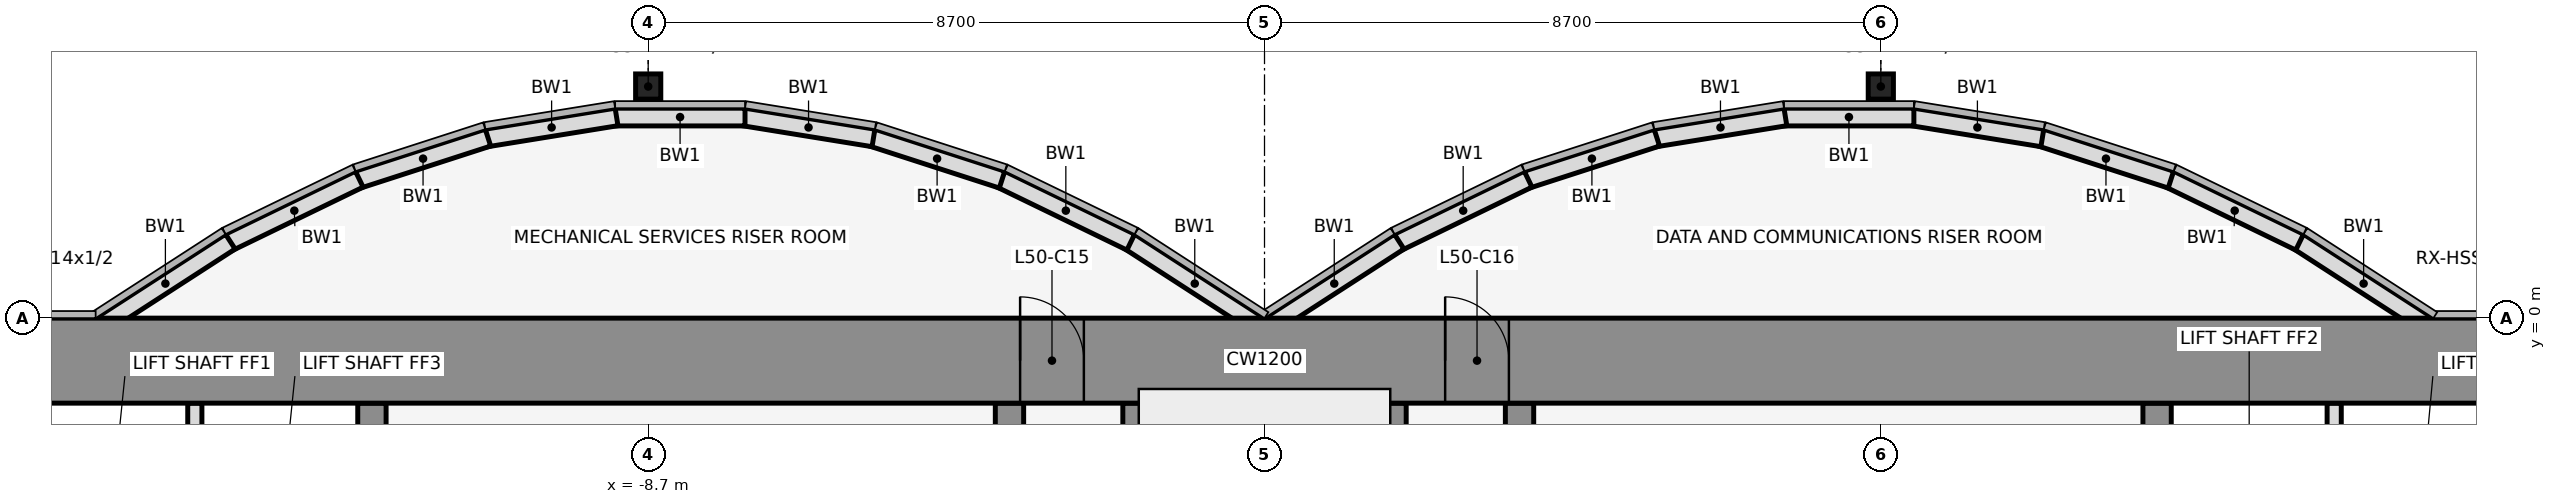
"""IFC4 building model, lengths in metres.
Left out: names, types, materials, properties, quantities, classifications, styles, units other than length and angle.
Written with IfcOpenShell. Run it as: python <this file> out.ifc"""

import sys

from ifc_helpers import new_model, si_unit, direction, frame, frame_2d, origin, origin_2d, place, context, subcontext, project, spatial, rectangle, hollow_rectangle, extrude, element, fill, save


model = new_model("IFC4")
c1 = context("Model", 3, precision=1e-05, world=origin(), true_north=direction((0.0, 1.0)))
c2 = subcontext(c1, "Body", "Model", "MODEL_VIEW")
j1 = project(units=[si_unit("LENGTHUNIT", "METRE"), si_unit("PLANEANGLEUNIT", "RADIAN")], contexts=[c1])
p1 = place(None, origin())
s1 = spatial("IfcSite", under=j1, at=p1, CompositionType="ELEMENT")
p2 = place(p1, origin())
s2 = spatial("IfcBuilding", under=s1, at=p2, CompositionType="ELEMENT")
p3 = place(p2, frame((0.0, 0.0, 223.7)))
s3 = spatial("IfcBuildingStorey", under=s2, at=p3, CompositionType="ELEMENT", Elevation=223.7)
for number, where, z_axis, x_axis in (
    (1, (-8.7, 3.269, 0.0), (0.0, 0.0, 1.0), (1.0, 0.0, 0.0)),
    (2, (8.7, 3.269, 0.0), (0.0, 0.0, 1.0), (1.0, 0.0, 0.0)),
):
    element("IfcColumn", number, at=place(p3, frame(where, z_axis=z_axis, x_axis=x_axis)), inside=s3, PredefinedType="COLUMN", context=c2, shape_type="SweptSolid", body=[
        extrude(hollow_rectangle(XDim=0.356, YDim=0.356, WallThickness=0.012, at=origin_2d()), origin(), (0.0, 0.0, 1.0), 4.1),
    ])
p4 = place(p3, frame((16.432, -0.105, 0.0), z_axis=(0.0, 0.0, 1.0), x_axis=(-0.83981312244, 0.542875602121, 0.0)))
e3 = element("IfcWall", 3, at=p4, inside=s3, PredefinedType="STANDARD", context=c2, shape_type="SweptSolid", body=[
    extrude(rectangle(XDim=2.183, YDim=0.25, at=frame_2d((1.091, 0.0))), origin(), (0.0, 0.0, 1.0), 3.95),
])
p5 = place(p3, frame((14.612, 1.073, 0.0), z_axis=(0.0, 0.0, 1.0), x_axis=(-0.89982408427, 0.436252928206, 0.0)))
e4 = element("IfcWall", 4, at=p5, inside=s3, PredefinedType="STANDARD", context=c2, shape_type="SweptSolid", body=[
    extrude(rectangle(XDim=2.038, YDim=0.25, at=frame_2d((1.019, 0.0))), origin(), (0.0, 0.0, 1.0), 3.95),
])
p6 = place(p3, frame((12.795, 1.955, 0.0), z_axis=(0.0, 0.0, 1.0), x_axis=(-0.951495806175, 0.307661714928, 0.0)))
e5 = element("IfcWall", 5, at=p6, inside=s3, PredefinedType="STANDARD", context=c2, shape_type="SweptSolid", body=[
    extrude(rectangle(XDim=1.927, YDim=0.25, at=frame_2d((0.963, 0.0))), origin(), (0.0, 0.0, 1.0), 3.95),
])
p7 = place(p3, frame((10.98, 2.543, 0.0), z_axis=(0.0, 0.0, 1.0), x_axis=(-0.987181718931, 0.159600293885, 0.0)))
e6 = element("IfcWall", 6, at=p7, inside=s3, PredefinedType="STANDARD", context=c2, shape_type="SweptSolid", body=[
    extrude(rectangle(XDim=1.857, YDim=0.25, at=frame_2d((0.929, 0.0))), origin(), (0.0, 0.0, 1.0), 3.95),
])
p8 = place(p3, frame((9.167, 2.838, 0.0), z_axis=(0.0, 0.0, 1.0), x_axis=(-1.0, 0.0, 0.0)))
e7 = element("IfcWall", 7, at=p8, inside=s3, PredefinedType="STANDARD", context=c2, shape_type="SweptSolid", body=[
    extrude(rectangle(XDim=1.833, YDim=0.25, at=frame_2d((0.917, 0.0))), origin(), (0.0, 0.0, 1.0), 3.95),
])
p9 = place(p3, frame((7.353, 2.84, 0.0), z_axis=(0.0, 0.0, 1.0), x_axis=(-0.987181718931, -0.159600293885, 0.0)))
e8 = element("IfcWall", 8, at=p9, inside=s3, PredefinedType="STANDARD", context=c2, shape_type="SweptSolid", body=[
    extrude(rectangle(XDim=1.857, YDim=0.25, at=frame_2d((0.929, 0.0))), origin(), (0.0, 0.0, 1.0), 3.95),
])
p10 = place(p3, frame((5.538, 2.548, 0.0), z_axis=(0.0, 0.0, 1.0), x_axis=(-0.951495806175, -0.307661714928, 0.0)))
e9 = element("IfcWall", 9, at=p10, inside=s3, PredefinedType="STANDARD", context=c2, shape_type="SweptSolid", body=[
    extrude(rectangle(XDim=1.927, YDim=0.25, at=frame_2d((0.963, 0.0))), origin(), (0.0, 0.0, 1.0), 3.95),
])
p11 = place(p3, frame((3.721, 1.962, 0.0), z_axis=(0.0, 0.0, 1.0), x_axis=(-0.89982408427, -0.436252928206, 0.0)))
e10 = element("IfcWall", 10, at=p11, inside=s3, PredefinedType="STANDARD", context=c2, shape_type="SweptSolid", body=[
    extrude(rectangle(XDim=2.038, YDim=0.25, at=frame_2d((1.019, 0.0))), origin(), (0.0, 0.0, 1.0), 3.95),
])
for number, where, z_axis, x_axis in (
    (11, (1.901, 1.08, 0.0), (0.0, 0.0, 1.0), (-0.84, -0.543, 0.0)),
    (12, (-0.068, -0.105, 0.0), (0.0, 0.0, 1.0), (-0.84, 0.543, 0.0)),
):
    element("IfcWall", number, at=place(p3, frame(where, z_axis=z_axis, x_axis=x_axis)), inside=s3, PredefinedType="STANDARD", context=c2, shape_type="SweptSolid", body=[
        extrude(rectangle(XDim=2.183, YDim=0.25, at=frame_2d((1.091, 0.0))), origin(), (0.0, 0.0, 1.0), 3.95),
    ])
p12 = place(p3, frame((-1.888, 1.073, 0.0), z_axis=(0.0, 0.0, 1.0), x_axis=(-0.89982408427, 0.436252928206, 0.0)))
e13 = element("IfcWall", 13, at=p12, inside=s3, PredefinedType="STANDARD", context=c2, shape_type="SweptSolid", body=[
    extrude(rectangle(XDim=2.038, YDim=0.25, at=frame_2d((1.019, 0.0))), origin(), (0.0, 0.0, 1.0), 3.95),
])
p13 = place(p3, frame((-3.705, 1.955, 0.0), z_axis=(0.0, 0.0, 1.0), x_axis=(-0.951495806175, 0.307661714928, 0.0)))
e14 = element("IfcWall", 14, at=p13, inside=s3, PredefinedType="STANDARD", context=c2, shape_type="SweptSolid", body=[
    extrude(rectangle(XDim=1.927, YDim=0.25, at=frame_2d((0.963, 0.0))), origin(), (0.0, 0.0, 1.0), 3.95),
])
p14 = place(p3, frame((-5.52, 2.543, 0.0), z_axis=(0.0, 0.0, 1.0), x_axis=(-0.987181718931, 0.159600293885, 0.0)))
e15 = element("IfcWall", 15, at=p14, inside=s3, PredefinedType="STANDARD", context=c2, shape_type="SweptSolid", body=[
    extrude(rectangle(XDim=1.857, YDim=0.25, at=frame_2d((0.929, 0.0))), origin(), (0.0, 0.0, 1.0), 3.95),
])
p15 = place(p3, frame((-7.333, 2.838, 0.0), z_axis=(0.0, 0.0, 1.0), x_axis=(-1.0, 0.0, 0.0)))
e16 = element("IfcWall", 16, at=p15, inside=s3, PredefinedType="STANDARD", context=c2, shape_type="SweptSolid", body=[
    extrude(rectangle(XDim=1.833, YDim=0.25, at=frame_2d((0.917, 0.0))), origin(), (0.0, 0.0, 1.0), 3.95),
])
p16 = place(p3, frame((-9.147, 2.84, 0.0), z_axis=(0.0, 0.0, 1.0), x_axis=(-0.987181718931, -0.159600293885, 0.0)))
e17 = element("IfcWall", 17, at=p16, inside=s3, PredefinedType="STANDARD", context=c2, shape_type="SweptSolid", body=[
    extrude(rectangle(XDim=1.857, YDim=0.25, at=frame_2d((0.929, 0.0))), origin(), (0.0, 0.0, 1.0), 3.95),
])
p17 = place(p3, frame((-10.962, 2.548, 0.0), z_axis=(0.0, 0.0, 1.0), x_axis=(-0.951495806175, -0.307661714928, 0.0)))
e18 = element("IfcWall", 18, at=p17, inside=s3, PredefinedType="STANDARD", context=c2, shape_type="SweptSolid", body=[
    extrude(rectangle(XDim=1.927, YDim=0.25, at=frame_2d((0.963, 0.0))), origin(), (0.0, 0.0, 1.0), 3.95),
])
p18 = place(p3, frame((-12.779, 1.962, 0.0), z_axis=(0.0, 0.0, 1.0), x_axis=(-0.89982408427, -0.436252928206, 0.0)))
e19 = element("IfcWall", 19, at=p18, inside=s3, PredefinedType="STANDARD", context=c2, shape_type="SweptSolid", body=[
    extrude(rectangle(XDim=2.038, YDim=0.25, at=frame_2d((1.019, 0.0))), origin(), (0.0, 0.0, 1.0), 3.95),
])
p19 = place(p3, frame((-14.599, 1.08, 0.0), z_axis=(0.0, 0.0, 1.0), x_axis=(-0.83981312244, -0.542875602121, 0.0)))
e20 = element("IfcWall", 20, at=p19, inside=s3, PredefinedType="STANDARD", context=c2, shape_type="SweptSolid", body=[
    extrude(rectangle(XDim=2.183, YDim=0.25, at=frame_2d((1.091, 0.0))), origin(), (0.0, 0.0, 1.0), 3.95),
])
p20 = place(p3, frame((-15.1, -4.6, 0.0), z_axis=(0.0, 0.0, 1.0), x_axis=(0.0, 1.0, 0.0)))
e21 = element("IfcWall", 21, at=p20, inside=s3, PredefinedType="PARTITIONING", context=c2, shape_type="SweptSolid", body=[
    extrude(rectangle(XDim=3.4, YDim=0.2, at=frame_2d((1.7, 0.0))), origin(), (0.0, 0.0, 1.0), 2.84),
])
p21 = place(p3, frame((-12.6, -11.8, 0.0), z_axis=(0.0, 0.0, 1.0), x_axis=(0.0, 1.0, 0.0)))
e22 = element("IfcWall", 22, at=p21, inside=s3, PredefinedType="SHEAR", context=c2, shape_type="SweptSolid", body=[
    extrude(rectangle(XDim=10.6, YDim=0.4, at=frame_2d((5.3, 0.0))), origin(), (0.0, 0.0, 1.0), 4.1),
])
p22 = place(p21, frame((4.75, 0.0, 0.0)))
e23 = element("IfcOpeningElement", 23, at=p22, cuts=e22, PredefinedType="OPENING", context=c2, shape_type="SweptSolid", body=[
    extrude(rectangle(XDim=1.1, YDim=2.1, at=frame_2d((0.55, 1.05))), frame((0.0, 0.212, 0.0), z_axis=(0.0, -1.0, 0.0), x_axis=(1.0, 0.0, 0.0)), (0.0, 0.0, 1.0), 0.424),
])
p23 = place(p3, frame((-3.6, -11.8, 0.0), z_axis=(0.0, 0.0, 1.0), x_axis=(0.0, 1.0, 0.0)))
e24 = element("IfcWall", 24, at=p23, inside=s3, PredefinedType="SHEAR", context=c2, shape_type="SweptSolid", body=[
    extrude(rectangle(XDim=10.6, YDim=0.4, at=frame_2d((5.3, 0.0))), origin(), (0.0, 0.0, 1.0), 4.1),
])
p24 = place(p23, frame((4.85, 0.0, 0.0)))
e25 = element("IfcOpeningElement", 25, at=p24, cuts=e24, PredefinedType="OPENING", context=c2, shape_type="SweptSolid", body=[
    extrude(rectangle(XDim=0.9, YDim=2.1, at=frame_2d((0.45, 1.05))), frame((0.0, 0.212, 0.0), z_axis=(0.0, -1.0, 0.0), x_axis=(1.0, 0.0, 0.0)), (0.0, 0.0, 1.0), 0.424),
])
for number, where, z_axis, x_axis in (
    (26, (-1.8, -11.8, 0.0), (0.0, 0.0, 1.0), (0.0, 1.0, 0.0)),
    (27, (1.8, -11.8, 0.0), (0.0, 0.0, 1.0), (0.0, 1.0, 0.0)),
):
    element("IfcWall", number, at=place(p3, frame(where, z_axis=z_axis, x_axis=x_axis)), inside=s3, PredefinedType="SHEAR", context=c2, shape_type="SweptSolid", body=[
        extrude(rectangle(XDim=10.6, YDim=0.4, at=frame_2d((5.3, 0.0))), origin(), (0.0, 0.0, 1.0), 4.1),
    ])
p25 = place(p3, frame((3.6, -11.8, 0.0), z_axis=(0.0, 0.0, 1.0), x_axis=(0.0, 1.0, 0.0)))
e28 = element("IfcWall", 28, at=p25, inside=s3, PredefinedType="SHEAR", context=c2, shape_type="SweptSolid", body=[
    extrude(rectangle(XDim=10.6, YDim=0.4, at=frame_2d((5.3, 0.0))), origin(), (0.0, 0.0, 1.0), 4.1),
])
p26 = place(p25, frame((1.35, 0.0, 0.0)))
e29 = element("IfcOpeningElement", 29, at=p26, cuts=e28, PredefinedType="OPENING", context=c2, shape_type="SweptSolid", body=[
    extrude(rectangle(XDim=0.9, YDim=2.1, at=frame_2d((0.45, 1.05))), frame((0.0, 0.212, 0.0), z_axis=(0.0, -1.0, 0.0), x_axis=(1.0, 0.0, 0.0)), (0.0, 0.0, 1.0), 0.424),
])
p27 = place(p3, frame((12.6, -11.8, 0.0), z_axis=(0.0, 0.0, 1.0), x_axis=(0.0, 1.0, 0.0)))
e30 = element("IfcWall", 30, at=p27, inside=s3, PredefinedType="SHEAR", context=c2, shape_type="SweptSolid", body=[
    extrude(rectangle(XDim=10.6, YDim=0.4, at=frame_2d((5.3, 0.0))), origin(), (0.0, 0.0, 1.0), 4.1),
])
p28 = place(p27, frame((1.25, 0.0, 0.0)))
e31 = element("IfcOpeningElement", 31, at=p28, cuts=e30, PredefinedType="OPENING", context=c2, shape_type="SweptSolid", body=[
    extrude(rectangle(XDim=1.2, YDim=2.1, at=frame_2d((0.6, 1.05))), frame((0.0, 0.212, 0.0), z_axis=(0.0, -1.0, 0.0), x_axis=(1.0, 0.0, 0.0)), (0.0, 0.0, 1.0), 0.424),
])
p29 = place(p27, frame((4.75, 0.0, 0.0)))
e32 = element("IfcOpeningElement", 32, at=p29, cuts=e30, PredefinedType="OPENING", context=c2, shape_type="SweptSolid", body=[
    extrude(rectangle(XDim=1.1, YDim=2.1, at=frame_2d((0.55, 1.05))), frame((0.0, 0.212, 0.0), z_axis=(0.0, -1.0, 0.0), x_axis=(1.0, 0.0, 0.0)), (0.0, 0.0, 1.0), 0.424),
])
p30 = place(p3, frame((15.1, -4.6, 0.0), z_axis=(0.0, 0.0, 1.0), x_axis=(0.0, 1.0, 0.0)))
e33 = element("IfcWall", 33, at=p30, inside=s3, PredefinedType="PARTITIONING", context=c2, shape_type="SweptSolid", body=[
    extrude(rectangle(XDim=3.4, YDim=0.2, at=frame_2d((1.7, 0.0))), origin(), (0.0, 0.0, 1.0), 2.84),
])
p31 = place(p3, frame((-22.0, -0.6, 0.0), z_axis=(0.0, 0.0, 1.0), x_axis=(1.0, 0.0, 0.0)))
e34 = element("IfcWall", 34, at=p31, inside=s3, PredefinedType="SHEAR", context=c2, shape_type="SweptSolid", body=[
    extrude(rectangle(XDim=44.0, YDim=1.2, at=frame_2d((22.0, 0.0))), origin(), (0.0, 0.0, 1.0), 4.1),
])
p32 = place(p31, frame((18.55, 0.0, 0.0)))
e35 = element("IfcOpeningElement", 35, at=p32, cuts=e34, PredefinedType="OPENING", context=c2, shape_type="SweptSolid", body=[
    extrude(rectangle(XDim=0.9, YDim=2.1, at=frame_2d((0.45, 1.05))), frame((0.0, 0.612, 0.0), z_axis=(0.0, -1.0, 0.0), x_axis=(1.0, 0.0, 0.0)), (0.0, 0.0, 1.0), 1.224),
])
p33 = place(p31, frame((24.55, 0.0, 0.0)))
e36 = element("IfcOpeningElement", 36, at=p33, cuts=e34, PredefinedType="OPENING", context=c2, shape_type="SweptSolid", body=[
    extrude(rectangle(XDim=0.9, YDim=2.1, at=frame_2d((0.45, 1.05))), frame((0.0, 0.612, 0.0), z_axis=(0.0, -1.0, 0.0), x_axis=(1.0, 0.0, 0.0)), (0.0, 0.0, 1.0), 1.224),
])
p34 = place(p32, origin())
e37 = element("IfcDoor", 37, at=p34, inside=s3, OperationType="SINGLE_SWING_LEFT", PredefinedType="DOOR", context=c2, shape_type="SweptSolid", body=[
    extrude(rectangle(XDim=0.9, YDim=2.1, at=frame_2d((0.45, 1.05))), frame((0.0, 0.025, 0.0), z_axis=(0.0, -1.0, 0.0), x_axis=(1.0, 0.0, 0.0)), (0.0, 0.0, 1.0), 0.05),
])
fill(e35, e37)
p35 = place(p33, origin())
e38 = element("IfcDoor", 38, at=p35, inside=s3, OperationType="SINGLE_SWING_LEFT", PredefinedType="DOOR", context=c2, shape_type="SweptSolid", body=[
    extrude(rectangle(XDim=0.9, YDim=2.1, at=frame_2d((0.45, 1.05))), frame((0.0, 0.025, 0.0), z_axis=(0.0, -1.0, 0.0), x_axis=(1.0, 0.0, 0.0)), (0.0, 0.0, 1.0), 0.05),
])
fill(e36, e38)
save(model, sys.argv[1])
